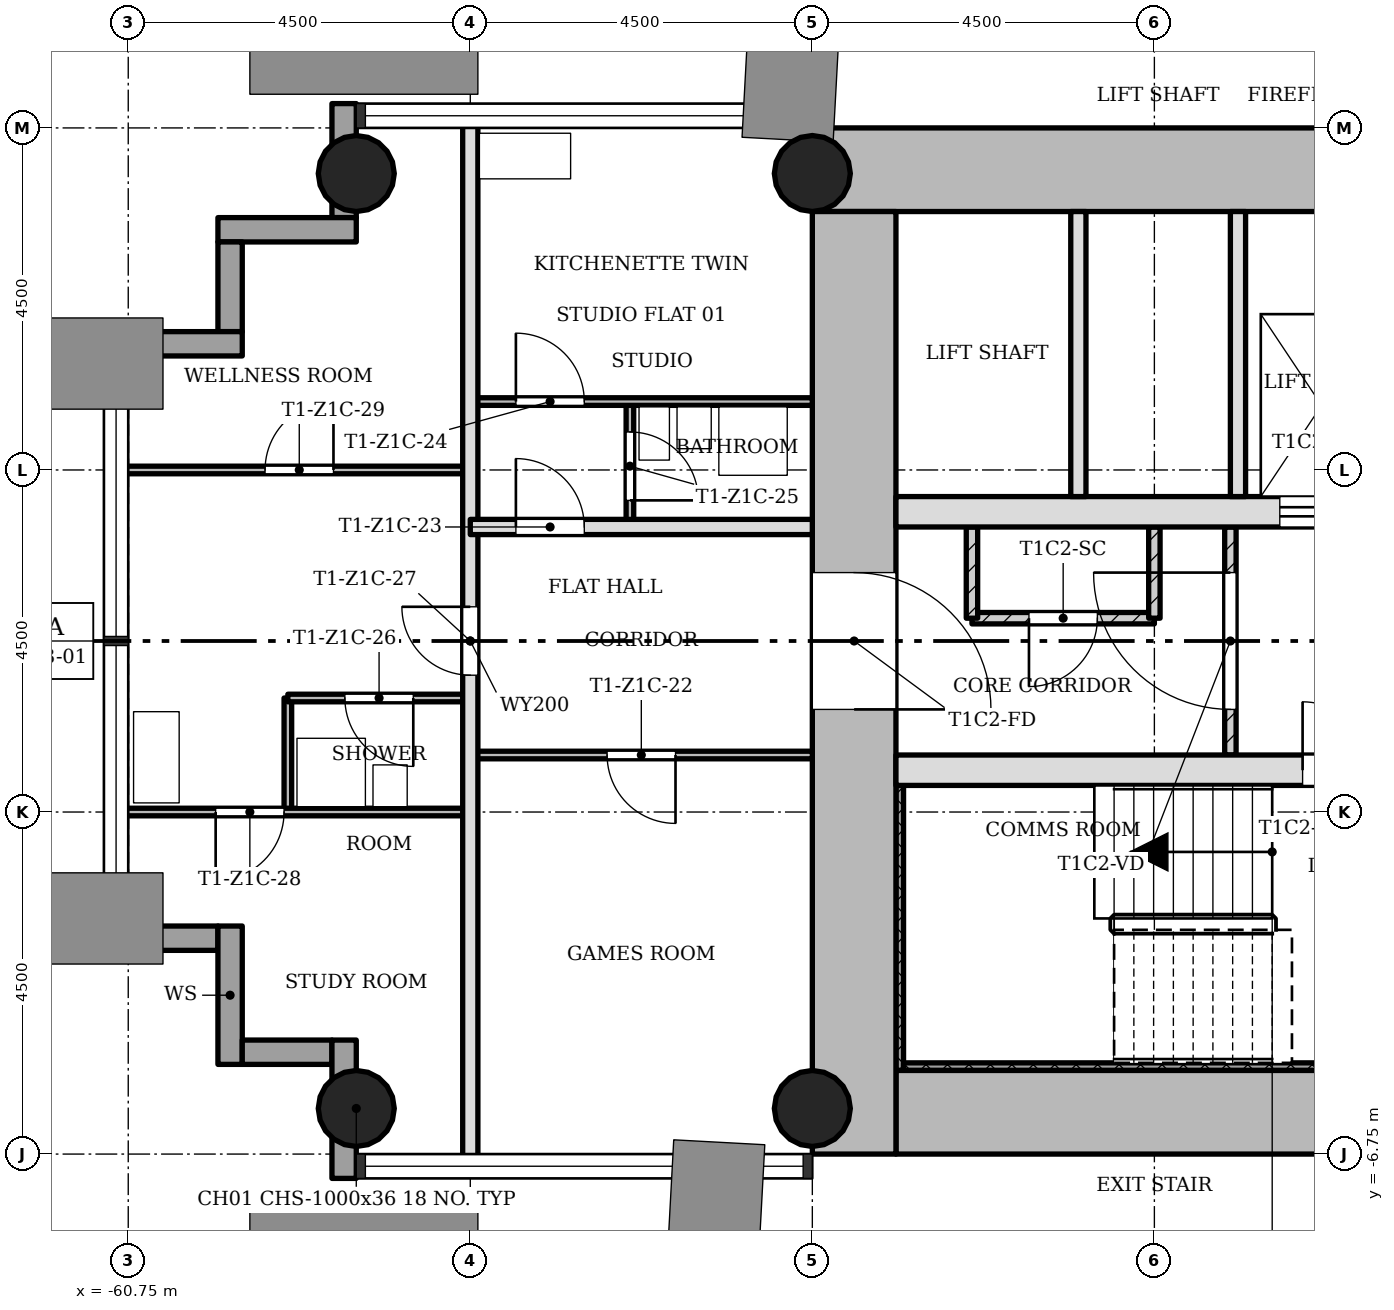
"""IFC4 building model, lengths in metres.
Left out: names, types, materials, properties, quantities, classifications, styles, units other than length and angle.
Written with IfcOpenShell. Run it as: python <this file> out.ifc"""

import sys

from ifc_helpers import new_model, si_unit, direction, frame, frame_2d, origin, origin_2d, place, context, subcontext, project, spatial, rectangle, hollow_circle, extrude, element, fill, save


model = new_model("IFC4")
c1 = context("Model", 3, precision=1e-05, world=origin(), true_north=direction((0.0, 1.0)))
c2 = subcontext(c1, "Body", "Model", "MODEL_VIEW")
j1 = project(units=[si_unit("LENGTHUNIT", "METRE"), si_unit("PLANEANGLEUNIT", "RADIAN")], contexts=[c1])
p1 = place(None, origin())
s1 = spatial("IfcSite", under=j1, at=p1, CompositionType="ELEMENT")
p2 = place(p1, origin())
s2 = spatial("IfcBuilding", under=s1, at=p2, CompositionType="ELEMENT")
p3 = place(p2, frame((0.0, 0.0, 44.9)))
s3 = spatial("IfcBuildingStorey", under=s2, at=p3, CompositionType="ELEMENT", Elevation=44.9)
p4 = place(p3, frame((-50.65, -6.2, 0.0), z_axis=(0.0, 0.0, 1.0), x_axis=(1.0, 0.0, 0.0)))
e1 = element("IfcWall", 1, at=p4, inside=s3, PredefinedType="SHEAR", context=c2, shape_type="SweptSolid", body=[
    extrude(rectangle(XDim=7.998, YDim=1.1, at=frame_2d((3.999, 0.0))), origin(), (0.0, 0.0, 1.0), 3.4),
])
p5 = place(p3, frame((-43.85, 6.2, 0.0), z_axis=(0.0, 0.0, 1.0), x_axis=(-1.0, 0.0, 0.0)))
e2 = element("IfcWall", 2, at=p5, inside=s3, PredefinedType="SHEAR", context=c2, shape_type="SweptSolid", body=[
    extrude(rectangle(XDim=7.9, YDim=1.1, at=frame_2d((3.95, 0.0))), origin(), (0.0, 0.0, 1.0), 3.4),
])
p6 = place(p3, frame((-51.2, 5.65, 0.0), z_axis=(0.0, 0.0, 1.0), x_axis=(0.0, -1.0, 0.0)))
e3 = element("IfcWall", 3, at=p6, inside=s3, PredefinedType="SHEAR", context=c2, shape_type="SweptSolid", body=[
    extrude(rectangle(XDim=12.4, YDim=1.1, at=frame_2d((6.2, 0.0))), origin(), (0.0, 0.0, 1.0), 3.4),
])
p7 = place(p6, frame((4.75, 0.0, 0.0)))
e4 = element("IfcOpeningElement", 4, at=p7, cuts=e3, PredefinedType="OPENING", context=c2, shape_type="SweptSolid", body=[
    extrude(rectangle(XDim=1.8, YDim=2.1, at=frame_2d((0.9, 1.05))), frame((0.0, 0.56, 0.0), z_axis=(0.0, -1.0, 0.0), x_axis=(1.0, 0.0, 0.0)), (0.0, 0.0, 1.0), 1.12),
])
p8 = place(p3, frame((-50.65, -1.7, 0.0), z_axis=(0.0, 0.0, 1.0), x_axis=(1.0, 0.0, 0.0)))
e5 = element("IfcWall", 5, at=p8, inside=s3, PredefinedType="SHEAR", context=c2, shape_type="SweptSolid", body=[
    extrude(rectangle(XDim=6.8, YDim=0.4, at=frame_2d((3.4, 0.0))), origin(), (0.0, 0.0, 1.0), 3.4),
])
p9 = place(p8, frame((5.35, 0.0, 0.0)))
e6 = element("IfcOpeningElement", 6, at=p9, cuts=e5, PredefinedType="OPENING", context=c2, shape_type="SweptSolid", body=[
    extrude(rectangle(XDim=0.9, YDim=2.1, at=frame_2d((0.45, 1.05))), frame((0.0, 0.21, 0.0), z_axis=(0.0, -1.0, 0.0), x_axis=(1.0, 0.0, 0.0)), (0.0, 0.0, 1.0), 0.42),
])
p10 = place(p3, frame((-50.65, 1.7, 0.0), z_axis=(0.0, 0.0, 1.0), x_axis=(1.0, 0.0, 0.0)))
e7 = element("IfcWall", 7, at=p10, inside=s3, PredefinedType="SHEAR", context=c2, shape_type="SweptSolid", body=[
    extrude(rectangle(XDim=6.8, YDim=0.4, at=frame_2d((3.4, 0.0))), origin(), (0.0, 0.0, 1.0), 3.4),
])
p11 = place(p10, frame((5.05, 0.0, 0.0)))
e8 = element("IfcOpeningElement", 8, at=p11, cuts=e7, PredefinedType="OPENING", context=c2, shape_type="SweptSolid", body=[
    extrude(rectangle(XDim=1.1, YDim=2.1, at=frame_2d((0.55, 1.05))), frame((0.0, 0.21, 0.0), z_axis=(0.0, -1.0, 0.0), x_axis=(1.0, 0.0, 0.0)), (0.0, 0.0, 1.0), 0.42),
])
for number, where, z_axis, x_axis in (
    (9, (-51.75, -6.15, 0.0), (0.0, 0.0, 1.0), (1.0, 0.0, 0.0)),
    (10, (-51.75, 6.15, 0.0), (0.0, 0.0, 1.0), (1.0, 0.0, 0.0)),
    (11, (-57.75, -6.15, 0.0), (0.0, 0.0, 1.0), (1.0, 0.0, 0.0)),
    (12, (-57.75, 6.15, 0.0), (0.0, 0.0, 1.0), (1.0, 0.0, 0.0)),
):
    element("IfcColumn", number, at=place(p3, frame(where, z_axis=z_axis, x_axis=x_axis)), inside=s3, PredefinedType="COLUMN", context=c2, shape_type="SweptSolid", body=[
        extrude(hollow_circle(Radius=0.5, WallThickness=0.036, at=origin_2d()), origin(), (0.0, 0.0, 1.0), 3.4),
    ])
p12 = place(p3, frame((-61.07, -3.91, -0.3), z_axis=(0.0, 0.0, 1.0), x_axis=(1.0, 0.0, 0.0)))
e13 = element("IfcWall", 13, at=p12, inside=s3, PredefinedType="STANDARD", context=c2, shape_type="SweptSolid", body=[
    extrude(rectangle(XDim=1.5, YDim=0.32, at=frame_2d((0.75, 0.0))), origin(), (0.0, 0.0, 1.0), 3.4),
])
p13 = place(p3, frame((-59.41, -3.75, -0.3), z_axis=(0.0, 0.0, 1.0), x_axis=(0.0, -1.0, 0.0)))
e14 = element("IfcWall", 14, at=p13, inside=s3, PredefinedType="STANDARD", context=c2, shape_type="SweptSolid", body=[
    extrude(rectangle(XDim=1.82, YDim=0.32, at=frame_2d((0.91, 0.0))), origin(), (0.0, 0.0, 1.0), 3.4),
])
p14 = place(p3, frame((-59.25, -5.41, -0.3), z_axis=(0.0, 0.0, 1.0), x_axis=(1.0, 0.0, 0.0)))
e15 = element("IfcWall", 15, at=p14, inside=s3, PredefinedType="STANDARD", context=c2, shape_type="SweptSolid", body=[
    extrude(rectangle(XDim=1.18, YDim=0.32, at=frame_2d((0.59, 0.0))), origin(), (0.0, 0.0, 1.0), 3.4),
])
p15 = place(p3, frame((-57.91, -5.25, -0.3), z_axis=(0.0, 0.0, 1.0), x_axis=(0.0, -1.0, 0.0)))
e16 = element("IfcWall", 16, at=p15, inside=s3, PredefinedType="STANDARD", context=c2, shape_type="SweptSolid", body=[
    extrude(rectangle(XDim=1.82, YDim=0.32, at=frame_2d((0.91, 0.0))), origin(), (0.0, 0.0, 1.0), 3.4),
])
p16 = place(p3, frame((-57.91, 7.07, -0.3), z_axis=(0.0, 0.0, 1.0), x_axis=(0.0, -1.0, 0.0)))
e17 = element("IfcWall", 17, at=p16, inside=s3, PredefinedType="STANDARD", context=c2, shape_type="SweptSolid", body=[
    extrude(rectangle(XDim=1.5, YDim=0.32, at=frame_2d((0.75, 0.0))), origin(), (0.0, 0.0, 1.0), 3.4),
])
p17 = place(p3, frame((-57.75, 5.41, -0.3), z_axis=(0.0, 0.0, 1.0), x_axis=(-1.0, 0.0, 0.0)))
e18 = element("IfcWall", 18, at=p17, inside=s3, PredefinedType="STANDARD", context=c2, shape_type="SweptSolid", body=[
    extrude(rectangle(XDim=1.82, YDim=0.32, at=frame_2d((0.91, 0.0))), origin(), (0.0, 0.0, 1.0), 3.4),
])
p18 = place(p3, frame((-59.41, 5.25, -0.3), z_axis=(0.0, 0.0, 1.0), x_axis=(0.0, -1.0, 0.0)))
e19 = element("IfcWall", 19, at=p18, inside=s3, PredefinedType="STANDARD", context=c2, shape_type="SweptSolid", body=[
    extrude(rectangle(XDim=1.18, YDim=0.32, at=frame_2d((0.59, 0.0))), origin(), (0.0, 0.0, 1.0), 3.4),
])
p19 = place(p3, frame((-59.25, 3.91, -0.3), z_axis=(0.0, 0.0, 1.0), x_axis=(-1.0, 0.0, 0.0)))
e20 = element("IfcWall", 20, at=p19, inside=s3, PredefinedType="STANDARD", context=c2, shape_type="SweptSolid", body=[
    extrude(rectangle(XDim=1.82, YDim=0.32, at=frame_2d((0.91, 0.0))), origin(), (0.0, 0.0, 1.0), 3.4),
])
p20 = place(p3, frame((-46.25, 1.5, 0.0), z_axis=(0.0, 0.0, 1.0), x_axis=(0.0, -1.0, 0.0)))
e21 = element("IfcWall", 21, at=p20, inside=s3, PredefinedType="PARTITIONING", context=c2, shape_type="SweptSolid", body=[
    extrude(rectangle(XDim=3.0, YDim=0.15, at=frame_2d((1.5, 0.0))), origin(), (0.0, 0.0, 1.0), 3.0),
])
p21 = place(p20, frame((0.6, 0.0, 0.0)))
e22 = element("IfcOpeningElement", 22, at=p21, cuts=e21, PredefinedType="OPENING", context=c2, shape_type="SweptSolid", body=[
    extrude(rectangle(XDim=1.8, YDim=2.1, at=frame_2d((0.9, 1.05))), frame((0.0, 0.085, 0.0), z_axis=(0.0, -1.0, 0.0), x_axis=(1.0, 0.0, 0.0)), (0.0, 0.0, 1.0), 0.17),
])
for number, where, z_axis, x_axis in (
    (23, (-46.15, 5.65, 0.0), (0.0, 0.0, 1.0), (0.0, -1.0, 0.0)),
    (24, (-48.25, 5.65, 0.0), (0.0, 0.0, 1.0), (0.0, -1.0, 0.0)),
):
    element("IfcWall", number, at=place(p3, frame(where, z_axis=z_axis, x_axis=x_axis)), inside=s3, PredefinedType="SOLIDWALL", context=c2, shape_type="SweptSolid", body=[
        extrude(rectangle(XDim=3.75, YDim=0.2, at=frame_2d((1.875, 0.0))), origin(), (0.0, 0.0, 1.0), 3.0),
    ])
p22 = place(p3, frame((-47.25, 0.3, 0.0), z_axis=(0.0, 0.0, 1.0), x_axis=(-1.0, 0.0, 0.0)))
e25 = element("IfcWall", 25, at=p22, inside=s3, PredefinedType="PARTITIONING", context=c2, shape_type="SweptSolid", body=[
    extrude(rectangle(XDim=2.4, YDim=0.15, at=frame_2d((1.2, 0.0))), origin(), (0.0, 0.0, 1.0), 3.0),
])
p23 = place(p22, frame((0.75, 0.0, 0.0)))
e26 = element("IfcOpeningElement", 26, at=p23, cuts=e25, PredefinedType="OPENING", context=c2, shape_type="SweptSolid", body=[
    extrude(rectangle(XDim=0.9, YDim=2.1, at=frame_2d((0.45, 1.05))), frame((0.0, 0.085, 0.0), z_axis=(0.0, -1.0, 0.0), x_axis=(1.0, 0.0, 0.0)), (0.0, 0.0, 1.0), 0.17),
])
for number, where, z_axis, x_axis in (
    (27, (-47.25, 0.3, 0.0), (0.0, 0.0, 1.0), (0.0, 1.0, 0.0)),
    (28, (-49.65, 0.3, 0.0), (0.0, 0.0, 1.0), (0.0, 1.0, 0.0)),
):
    element("IfcWall", number, at=place(p3, frame(where, z_axis=z_axis, x_axis=x_axis)), inside=s3, PredefinedType="PARTITIONING", context=c2, shape_type="SweptSolid", body=[
        extrude(rectangle(XDim=1.2, YDim=0.15, at=frame_2d((0.6, 0.0))), origin(), (0.0, 0.0, 1.0), 3.0),
    ])
p24 = place(p3, frame((-58.65, -2.25, 0.0), z_axis=(0.0, 0.0, 1.0), x_axis=(0.0, 1.0, 0.0)))
e29 = element("IfcWall", 29, at=p24, inside=s3, PredefinedType="PARTITIONING", context=c2, shape_type="SweptSolid", body=[
    extrude(rectangle(XDim=1.5, YDim=0.1, at=frame_2d((0.75, 0.0))), origin(), (0.0, 0.0, 1.0), 3.0),
])
p25 = place(p3, frame((-56.25, -6.85, 0.0), z_axis=(0.0, 0.0, 1.0), x_axis=(0.0, 1.0, 0.0)))
e30 = element("IfcWall", 30, at=p25, inside=s3, PredefinedType="SOLIDWALL", context=c2, shape_type="SweptSolid", body=[
    extrude(rectangle(XDim=13.7, YDim=0.2, at=frame_2d((6.85, 0.0))), origin(), (0.0, 0.0, 1.0), 3.0),
])
p26 = place(p25, frame((6.4, 0.0, 0.0)))
e31 = element("IfcOpeningElement", 31, at=p26, cuts=e30, PredefinedType="OPENING", context=c2, shape_type="SweptSolid", body=[
    extrude(rectangle(XDim=0.9, YDim=2.1, at=frame_2d((0.45, 1.05))), frame((0.0, 0.11, 0.0), z_axis=(0.0, -1.0, 0.0), x_axis=(1.0, 0.0, 0.0)), (0.0, 0.0, 1.0), 0.22),
])
p27 = place(p3, frame((-54.15, 1.5, 0.0), z_axis=(0.0, 0.0, 1.0), x_axis=(0.0, 1.0, 0.0)))
e32 = element("IfcWall", 32, at=p27, inside=s3, PredefinedType="PARTITIONING", context=c2, shape_type="SweptSolid", body=[
    extrude(rectangle(XDim=1.65, YDim=0.1, at=frame_2d((0.825, 0.0))), origin(), (0.0, 0.0, 1.0), 3.0),
])
p28 = place(p27, frame((0.35, 0.0, 0.0)))
e33 = element("IfcOpeningElement", 33, at=p28, cuts=e32, PredefinedType="OPENING", context=c2, shape_type="SweptSolid", body=[
    extrude(rectangle(XDim=0.9, YDim=2.1, at=frame_2d((0.45, 1.05))), frame((0.0, 0.06, 0.0), z_axis=(0.0, -1.0, 0.0), x_axis=(1.0, 0.0, 0.0)), (0.0, 0.0, 1.0), 0.12),
])
p29 = place(p3, frame((-60.85, -2.25, 0.0), z_axis=(0.0, 0.0, 1.0), x_axis=(1.0, 0.0, 0.0)))
e34 = element("IfcWall", 34, at=p29, inside=s3, PredefinedType="PARTITIONING", context=c2, shape_type="SweptSolid", body=[
    extrude(rectangle(XDim=4.6, YDim=0.1, at=frame_2d((2.3, 0.0))), origin(), (0.0, 0.0, 1.0), 3.0),
])
p30 = place(p29, frame((1.25, 0.0, 0.0)))
e35 = element("IfcOpeningElement", 35, at=p30, cuts=e34, PredefinedType="OPENING", context=c2, shape_type="SweptSolid", body=[
    extrude(rectangle(XDim=0.9, YDim=2.1, at=frame_2d((0.45, 1.05))), frame((0.0, 0.06, 0.0), z_axis=(0.0, -1.0, 0.0), x_axis=(1.0, 0.0, 0.0)), (0.0, 0.0, 1.0), 0.12),
])
p31 = place(p3, frame((-56.25, -1.5, 0.0), z_axis=(0.0, 0.0, 1.0), x_axis=(1.0, 0.0, 0.0)))
e36 = element("IfcWall", 36, at=p31, inside=s3, PredefinedType="PARTITIONING", context=c2, shape_type="SweptSolid", body=[
    extrude(rectangle(XDim=4.5, YDim=0.1, at=frame_2d((2.25, 0.0))), origin(), (0.0, 0.0, 1.0), 3.0),
])
p32 = place(p31, frame((1.8, 0.0, 0.0)))
e37 = element("IfcOpeningElement", 37, at=p32, cuts=e36, PredefinedType="OPENING", context=c2, shape_type="SweptSolid", body=[
    extrude(rectangle(XDim=0.9, YDim=2.1, at=frame_2d((0.45, 1.05))), frame((0.0, 0.06, 0.0), z_axis=(0.0, -1.0, 0.0), x_axis=(1.0, 0.0, 0.0)), (0.0, 0.0, 1.0), 0.12),
])
p33 = place(p3, frame((-58.65, -0.75, 0.0), z_axis=(0.0, 0.0, 1.0), x_axis=(1.0, 0.0, 0.0)))
e38 = element("IfcWall", 38, at=p33, inside=s3, PredefinedType="PARTITIONING", context=c2, shape_type="SweptSolid", body=[
    extrude(rectangle(XDim=2.4, YDim=0.1, at=frame_2d((1.2, 0.0))), origin(), (0.0, 0.0, 1.0), 3.0),
])
p34 = place(p33, frame((0.75, 0.0, 0.0)))
e39 = element("IfcOpeningElement", 39, at=p34, cuts=e38, PredefinedType="OPENING", context=c2, shape_type="SweptSolid", body=[
    extrude(rectangle(XDim=0.9, YDim=2.1, at=frame_2d((0.45, 1.05))), frame((0.0, 0.06, 0.0), z_axis=(0.0, -1.0, 0.0), x_axis=(1.0, 0.0, 0.0)), (0.0, 0.0, 1.0), 0.12),
])
p35 = place(p3, frame((-56.25, 1.5, 0.0), z_axis=(0.0, 0.0, 1.0), x_axis=(1.0, 0.0, 0.0)))
e40 = element("IfcWall", 40, at=p35, inside=s3, PredefinedType="SOLIDWALL", context=c2, shape_type="SweptSolid", body=[
    extrude(rectangle(XDim=4.5, YDim=0.2, at=frame_2d((2.25, 0.0))), origin(), (0.0, 0.0, 1.0), 3.0),
])
p36 = place(p35, frame((0.6, 0.0, 0.0)))
e41 = element("IfcOpeningElement", 41, at=p36, cuts=e40, PredefinedType="OPENING", context=c2, shape_type="SweptSolid", body=[
    extrude(rectangle(XDim=0.9, YDim=2.1, at=frame_2d((0.45, 1.05))), frame((0.0, 0.11, 0.0), z_axis=(0.0, -1.0, 0.0), x_axis=(1.0, 0.0, 0.0)), (0.0, 0.0, 1.0), 0.22),
])
p37 = place(p3, frame((-60.85, 2.25, 0.0), z_axis=(0.0, 0.0, 1.0), x_axis=(1.0, 0.0, 0.0)))
e42 = element("IfcWall", 42, at=p37, inside=s3, PredefinedType="PARTITIONING", context=c2, shape_type="SweptSolid", body=[
    extrude(rectangle(XDim=4.6, YDim=0.1, at=frame_2d((2.3, 0.0))), origin(), (0.0, 0.0, 1.0), 3.0),
])
p38 = place(p37, frame((1.9, 0.0, 0.0)))
e43 = element("IfcOpeningElement", 43, at=p38, cuts=e42, PredefinedType="OPENING", context=c2, shape_type="SweptSolid", body=[
    extrude(rectangle(XDim=0.9, YDim=2.1, at=frame_2d((0.45, 1.05))), frame((0.0, 0.06, 0.0), z_axis=(0.0, -1.0, 0.0), x_axis=(1.0, 0.0, 0.0)), (0.0, 0.0, 1.0), 0.12),
])
p39 = place(p3, frame((-56.25, 3.15, 0.0), z_axis=(0.0, 0.0, 1.0), x_axis=(1.0, 0.0, 0.0)))
e44 = element("IfcWall", 44, at=p39, inside=s3, PredefinedType="PARTITIONING", context=c2, shape_type="SweptSolid", body=[
    extrude(rectangle(XDim=4.5, YDim=0.1, at=frame_2d((2.25, 0.0))), origin(), (0.0, 0.0, 1.0), 3.0),
])
p40 = place(p39, frame((0.6, 0.0, 0.0)))
e45 = element("IfcOpeningElement", 45, at=p40, cuts=e44, PredefinedType="OPENING", context=c2, shape_type="SweptSolid", body=[
    extrude(rectangle(XDim=0.9, YDim=2.1, at=frame_2d((0.45, 1.05))), frame((0.0, 0.06, 0.0), z_axis=(0.0, -1.0, 0.0), x_axis=(1.0, 0.0, 0.0)), (0.0, 0.0, 1.0), 0.12),
])
p41 = place(p3, frame((-50.6, -1.9, 0.0), z_axis=(0.0, 0.0, 1.0), x_axis=(0.0, -1.0, 0.0)))
e46 = element("IfcWall", 46, at=p41, inside=s3, PredefinedType="SHEAR", context=c2, shape_type="SweptSolid", body=[
    extrude(rectangle(XDim=3.75, YDim=0.1, at=frame_2d((1.875, 0.0))), origin(), (0.0, 0.0, 1.0), 3.4),
])
p42 = place(p3, frame((-43.95, -5.6, 0.0), z_axis=(0.0, 0.0, 1.0), x_axis=(-1.0, 0.0, 0.0)))
e47 = element("IfcWall", 47, at=p42, inside=s3, PredefinedType="SHEAR", context=c2, shape_type="SweptSolid", body=[
    extrude(rectangle(XDim=6.6, YDim=0.1, at=frame_2d((3.3, 0.0))), origin(), (0.0, 0.0, 1.0), 3.4),
])
p43 = place(p21, origin())
e48 = element("IfcDoor", 48, at=p43, inside=s3, OperationType="SINGLE_SWING_LEFT", PredefinedType="DOOR", context=c2, shape_type="SweptSolid", body=[
    extrude(rectangle(XDim=1.8, YDim=2.1, at=frame_2d((0.9, 1.05))), frame((0.0, 0.025, 0.0), z_axis=(0.0, -1.0, 0.0), x_axis=(1.0, 0.0, 0.0)), (0.0, 0.0, 1.0), 0.05),
])
fill(e22, e48)
p44 = place(p23, origin())
e49 = element("IfcDoor", 49, at=p44, inside=s3, OperationType="SINGLE_SWING_LEFT", PredefinedType="DOOR", context=c2, shape_type="SweptSolid", body=[
    extrude(rectangle(XDim=0.9, YDim=2.1, at=frame_2d((0.45, 1.05))), frame((0.0, 0.025, 0.0), z_axis=(0.0, -1.0, 0.0), x_axis=(1.0, 0.0, 0.0)), (0.0, 0.0, 1.0), 0.05),
])
fill(e26, e49)
p45 = place(p32, origin())
e50 = element("IfcDoor", 50, at=p45, inside=s3, OperationType="SINGLE_SWING_RIGHT", PredefinedType="DOOR", context=c2, shape_type="SweptSolid", body=[
    extrude(rectangle(XDim=0.9, YDim=2.1, at=frame_2d((0.45, 1.05))), frame((0.0, 0.025, 0.0), z_axis=(0.0, -1.0, 0.0), x_axis=(1.0, 0.0, 0.0)), (0.0, 0.0, 1.0), 0.05),
])
fill(e37, e50)
p46 = place(p36, origin())
e51 = element("IfcDoor", 51, at=p46, inside=s3, OperationType="SINGLE_SWING_RIGHT", PredefinedType="DOOR", context=c2, shape_type="SweptSolid", body=[
    extrude(rectangle(XDim=0.9, YDim=2.1, at=frame_2d((0.45, 1.05))), frame((0.0, 0.025, 0.0), z_axis=(0.0, -1.0, 0.0), x_axis=(1.0, 0.0, 0.0)), (0.0, 0.0, 1.0), 0.05),
])
fill(e41, e51)
p47 = place(p40, origin())
e52 = element("IfcDoor", 52, at=p47, inside=s3, OperationType="SINGLE_SWING_RIGHT", PredefinedType="DOOR", context=c2, shape_type="SweptSolid", body=[
    extrude(rectangle(XDim=0.9, YDim=2.1, at=frame_2d((0.45, 1.05))), frame((0.0, 0.025, 0.0), z_axis=(0.0, -1.0, 0.0), x_axis=(1.0, 0.0, 0.0)), (0.0, 0.0, 1.0), 0.05),
])
fill(e45, e52)
p48 = place(p28, origin())
e53 = element("IfcDoor", 53, at=p48, inside=s3, OperationType="SINGLE_SWING_LEFT", PredefinedType="DOOR", context=c2, shape_type="SweptSolid", body=[
    extrude(rectangle(XDim=0.9, YDim=2.1, at=frame_2d((0.45, 1.05))), frame((0.0, 0.025, 0.0), z_axis=(0.0, -1.0, 0.0), x_axis=(1.0, 0.0, 0.0)), (0.0, 0.0, 1.0), 0.05),
])
fill(e33, e53)
p49 = place(p34, origin())
e54 = element("IfcDoor", 54, at=p49, inside=s3, OperationType="SINGLE_SWING_RIGHT", PredefinedType="DOOR", context=c2, shape_type="SweptSolid", body=[
    extrude(rectangle(XDim=0.9, YDim=2.1, at=frame_2d((0.45, 1.05))), frame((0.0, 0.025, 0.0), z_axis=(0.0, -1.0, 0.0), x_axis=(1.0, 0.0, 0.0)), (0.0, 0.0, 1.0), 0.05),
])
fill(e39, e54)
p50 = place(p26, origin())
e55 = element("IfcDoor", 55, at=p50, inside=s3, OperationType="SINGLE_SWING_LEFT", PredefinedType="DOOR", context=c2, shape_type="SweptSolid", body=[
    extrude(rectangle(XDim=0.9, YDim=2.1, at=frame_2d((0.45, 1.05))), frame((0.0, 0.025, 0.0), z_axis=(0.0, -1.0, 0.0), x_axis=(1.0, 0.0, 0.0)), (0.0, 0.0, 1.0), 0.05),
])
fill(e31, e55)
p51 = place(p30, origin())
e56 = element("IfcDoor", 56, at=p51, inside=s3, OperationType="SINGLE_SWING_LEFT", PredefinedType="DOOR", context=c2, shape_type="SweptSolid", body=[
    extrude(rectangle(XDim=0.9, YDim=2.1, at=frame_2d((0.45, 1.05))), frame((0.0, 0.025, 0.0), z_axis=(0.0, -1.0, 0.0), x_axis=(1.0, 0.0, 0.0)), (0.0, 0.0, 1.0), 0.05),
])
fill(e35, e56)
p52 = place(p38, origin())
e57 = element("IfcDoor", 57, at=p52, inside=s3, OperationType="SINGLE_SWING_LEFT", PredefinedType="DOOR", context=c2, shape_type="SweptSolid", body=[
    extrude(rectangle(XDim=0.9, YDim=2.1, at=frame_2d((0.45, 1.05))), frame((0.0, 0.025, 0.0), z_axis=(0.0, -1.0, 0.0), x_axis=(1.0, 0.0, 0.0)), (0.0, 0.0, 1.0), 0.05),
])
fill(e43, e57)
p53 = place(p9, origin())
e58 = element("IfcDoor", 58, at=p53, inside=s3, OperationType="SINGLE_SWING_RIGHT", PredefinedType="DOOR", context=c2, shape_type="SweptSolid", body=[
    extrude(rectangle(XDim=0.9, YDim=2.1, at=frame_2d((0.45, 1.05))), frame((0.0, 0.025, 0.0), z_axis=(0.0, -1.0, 0.0), x_axis=(1.0, 0.0, 0.0)), (0.0, 0.0, 1.0), 0.05),
])
fill(e6, e58)
p54 = place(p11, origin())
e59 = element("IfcDoor", 59, at=p54, inside=s3, OperationType="SLIDING_TO_LEFT", PredefinedType="DOOR", context=c2, shape_type="SweptSolid", body=[
    extrude(rectangle(XDim=1.1, YDim=2.1, at=frame_2d((0.55, 1.05))), frame((0.0, 0.025, 0.0), z_axis=(0.0, -1.0, 0.0), x_axis=(1.0, 0.0, 0.0)), (0.0, 0.0, 1.0), 0.05),
])
fill(e8, e59)
p55 = place(p7, origin())
e60 = element("IfcDoor", 60, at=p55, inside=s3, OperationType="SINGLE_SWING_LEFT", PredefinedType="DOOR", context=c2, shape_type="SweptSolid", body=[
    extrude(rectangle(XDim=1.8, YDim=2.1, at=frame_2d((0.9, 1.05))), frame((0.0, 0.025, 0.0), z_axis=(0.0, -1.0, 0.0), x_axis=(1.0, 0.0, 0.0)), (0.0, 0.0, 1.0), 0.05),
])
fill(e4, e60)
save(model, sys.argv[1])
